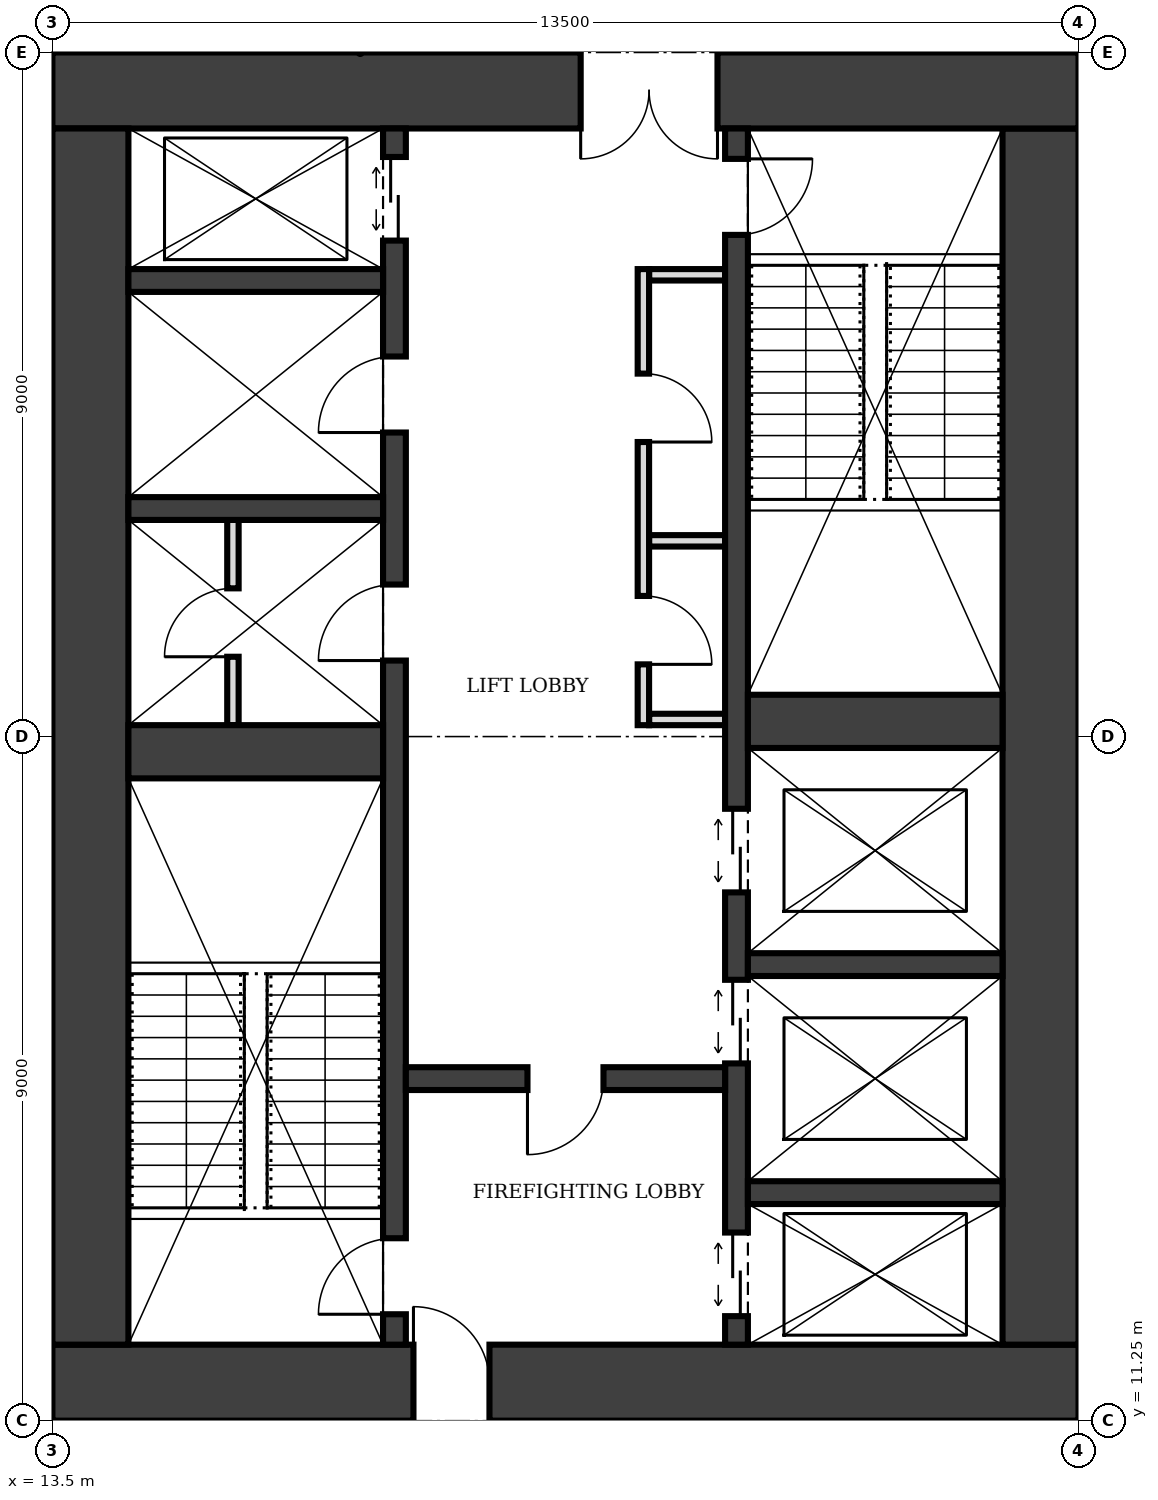
"""IFC4 building model, lengths in metres.
Left out: names, types, materials, properties, quantities, classifications, styles, units other than length and angle.
Written with IfcOpenShell. Run it as: python <this file> out.ifc"""

import sys

from ifc_helpers import new_model, si_unit, direction, frame, frame_2d, origin, place, context, subcontext, project, spatial, rectangle, extrude, element, fill, save


model = new_model("IFC4")
c1 = context("Model", 3, precision=1e-05, world=origin(), true_north=direction((0.0, 1.0)))
c2 = subcontext(c1, "Body", "Model", "MODEL_VIEW")
j1 = project(units=[si_unit("LENGTHUNIT", "METRE"), si_unit("PLANEANGLEUNIT", "RADIAN")], contexts=[c1])
p1 = place(None, origin())
s1 = spatial("IfcSite", under=j1, at=p1, CompositionType="ELEMENT")
p2 = place(p1, origin())
s2 = spatial("IfcBuilding", under=s1, at=p2, CompositionType="ELEMENT")
p3 = place(p2, frame((0.0, 0.0, 125.0)))
s3 = spatial("IfcBuildingStorey", under=s2, at=p3, CompositionType="ELEMENT", Elevation=125.0)
p4 = place(p3, frame((13.5, 11.75, 0.0), z_axis=(0.0, 0.0, 1.0), x_axis=(1.0, 0.0, 0.0)))
e1 = element("IfcWall", 1, at=p4, inside=s3, PredefinedType="SHEAR", context=c2, shape_type="SweptSolid", body=[
    extrude(rectangle(XDim=13.5, YDim=1.0, at=frame_2d((6.75, 0.0))), origin(), (0.0, 0.0, 1.0), 4.0),
])
p5 = place(p4, frame((4.75, 0.0, 0.0)))
e2 = element("IfcOpeningElement", 2, at=p5, cuts=e1, PredefinedType="OPENING", context=c2, shape_type="SweptSolid", body=[
    extrude(rectangle(XDim=1.0, YDim=2.1, at=frame_2d((0.5, 1.05))), frame((0.0, 0.51, 0.0), z_axis=(0.0, -1.0, 0.0), x_axis=(1.0, 0.0, 0.0)), (0.0, 0.0, 1.0), 1.02),
])
p6 = place(p3, frame((26.5, 12.25, 0.0), z_axis=(0.0, 0.0, 1.0), x_axis=(0.0, 1.0, 0.0)))
e3 = element("IfcWall", 3, at=p6, inside=s3, PredefinedType="SHEAR", context=c2, shape_type="SweptSolid", body=[
    extrude(rectangle(XDim=16.0, YDim=1.0, at=frame_2d((8.0, 0.0))), origin(), (0.0, 0.0, 1.0), 4.0),
])
p7 = place(p3, frame((27.0, 28.75, 0.0), z_axis=(0.0, 0.0, 1.0), x_axis=(-1.0, 0.0, 0.0)))
e4 = element("IfcWall", 4, at=p7, inside=s3, PredefinedType="SHEAR", context=c2, shape_type="SweptSolid", body=[
    extrude(rectangle(XDim=13.5, YDim=1.0, at=frame_2d((6.75, 0.0))), origin(), (0.0, 0.0, 1.0), 4.0),
])
p8 = place(p7, frame((4.75, 0.0, 0.0)))
e5 = element("IfcOpeningElement", 5, at=p8, cuts=e4, PredefinedType="OPENING", context=c2, shape_type="SweptSolid", body=[
    extrude(rectangle(XDim=1.8, YDim=2.1, at=frame_2d((0.9, 1.05))), frame((0.0, 0.51, 0.0), z_axis=(0.0, -1.0, 0.0), x_axis=(1.0, 0.0, 0.0)), (0.0, 0.0, 1.0), 1.02),
])
p9 = place(p3, frame((14.0, 28.25, 0.0), z_axis=(0.0, 0.0, 1.0), x_axis=(0.0, -1.0, 0.0)))
e6 = element("IfcWall", 6, at=p9, inside=s3, PredefinedType="SHEAR", context=c2, shape_type="SweptSolid", body=[
    extrude(rectangle(XDim=16.0, YDim=1.0, at=frame_2d((8.0, 0.0))), origin(), (0.0, 0.0, 1.0), 4.0),
])
p10 = place(p3, frame((18.0, 12.25, 0.0), z_axis=(0.0, 0.0, 1.0), x_axis=(0.0, 1.0, 0.0)))
e7 = element("IfcWall", 7, at=p10, inside=s3, PredefinedType="SHEAR", context=c2, shape_type="SweptSolid", body=[
    extrude(rectangle(XDim=16.0, YDim=0.3, at=frame_2d((8.0, 0.0))), origin(), (0.0, 0.0, 1.0), 4.0),
])
p11 = place(p10, frame((0.4, 0.0, 0.0)))
e8 = element("IfcOpeningElement", 8, at=p11, cuts=e7, PredefinedType="OPENING", context=c2, shape_type="SweptSolid", body=[
    extrude(rectangle(XDim=1.0, YDim=2.1, at=frame_2d((0.5, 1.05))), frame((0.0, 0.16, 0.0), z_axis=(0.0, -1.0, 0.0), x_axis=(1.0, 0.0, 0.0)), (0.0, 0.0, 1.0), 0.32),
])
p12 = place(p10, frame((14.525, 0.0, 0.0)))
e9 = element("IfcOpeningElement", 9, at=p12, cuts=e7, PredefinedType="OPENING", context=c2, shape_type="SweptSolid", body=[
    extrude(rectangle(XDim=1.1, YDim=2.1, at=frame_2d((0.55, 1.05))), frame((0.0, 0.16, 0.0), z_axis=(0.0, -1.0, 0.0), x_axis=(1.0, 0.0, 0.0)), (0.0, 0.0, 1.0), 0.32),
])
p13 = place(p10, frame((9.0, 0.0, 0.0)))
e10 = element("IfcOpeningElement", 10, at=p13, cuts=e7, PredefinedType="OPENING", context=c2, shape_type="SweptSolid", body=[
    extrude(rectangle(XDim=1.0, YDim=2.1, at=frame_2d((0.5, 1.05))), frame((0.0, 0.16, 0.0), z_axis=(0.0, -1.0, 0.0), x_axis=(1.0, 0.0, 0.0)), (0.0, 0.0, 1.0), 0.32),
])
p14 = place(p10, frame((12.0, 0.0, 0.0)))
e11 = element("IfcOpeningElement", 11, at=p14, cuts=e7, PredefinedType="OPENING", context=c2, shape_type="SweptSolid", body=[
    extrude(rectangle(XDim=1.0, YDim=2.1, at=frame_2d((0.5, 1.05))), frame((0.0, 0.16, 0.0), z_axis=(0.0, -1.0, 0.0), x_axis=(1.0, 0.0, 0.0)), (0.0, 0.0, 1.0), 0.32),
])
p15 = place(p3, frame((22.5, 12.25, 0.0), z_axis=(0.0, 0.0, 1.0), x_axis=(0.0, 1.0, 0.0)))
e12 = element("IfcWall", 12, at=p15, inside=s3, PredefinedType="SHEAR", context=c2, shape_type="SweptSolid", body=[
    extrude(rectangle(XDim=16.0, YDim=0.3, at=frame_2d((8.0, 0.0))), origin(), (0.0, 0.0, 1.0), 4.0),
])
p16 = place(p15, frame((14.6, 0.0, 0.0)))
e13 = element("IfcOpeningElement", 13, at=p16, cuts=e12, PredefinedType="OPENING", context=c2, shape_type="SweptSolid", body=[
    extrude(rectangle(XDim=1.0, YDim=2.1, at=frame_2d((0.5, 1.05))), frame((0.0, 0.16, 0.0), z_axis=(0.0, -1.0, 0.0), x_axis=(1.0, 0.0, 0.0)), (0.0, 0.0, 1.0), 0.32),
])
p17 = place(p15, frame((0.375, 0.0, 0.0)))
e14 = element("IfcOpeningElement", 14, at=p17, cuts=e12, PredefinedType="OPENING", context=c2, shape_type="SweptSolid", body=[
    extrude(rectangle(XDim=1.1, YDim=2.1, at=frame_2d((0.55, 1.05))), frame((0.0, 0.16, 0.0), z_axis=(0.0, -1.0, 0.0), x_axis=(1.0, 0.0, 0.0)), (0.0, 0.0, 1.0), 0.32),
])
p18 = place(p15, frame((3.7, 0.0, 0.0)))
e15 = element("IfcOpeningElement", 15, at=p18, cuts=e12, PredefinedType="OPENING", context=c2, shape_type="SweptSolid", body=[
    extrude(rectangle(XDim=1.1, YDim=2.1, at=frame_2d((0.55, 1.05))), frame((0.0, 0.16, 0.0), z_axis=(0.0, -1.0, 0.0), x_axis=(1.0, 0.0, 0.0)), (0.0, 0.0, 1.0), 0.32),
])
p19 = place(p15, frame((5.95, 0.0, 0.0)))
e16 = element("IfcOpeningElement", 16, at=p19, cuts=e12, PredefinedType="OPENING", context=c2, shape_type="SweptSolid", body=[
    extrude(rectangle(XDim=1.1, YDim=2.1, at=frame_2d((0.55, 1.05))), frame((0.0, 0.16, 0.0), z_axis=(0.0, -1.0, 0.0), x_axis=(1.0, 0.0, 0.0)), (0.0, 0.0, 1.0), 0.32),
])
p20 = place(p3, frame((14.5, 20.05, 0.0), z_axis=(0.0, 0.0, 1.0), x_axis=(1.0, 0.0, 0.0)))
e17 = element("IfcWall", 17, at=p20, inside=s3, PredefinedType="SHEAR", context=c2, shape_type="SweptSolid", body=[
    extrude(rectangle(XDim=3.35, YDim=0.7, at=frame_2d((1.675, 0.0))), origin(), (0.0, 0.0, 1.0), 4.0),
])
p21 = place(p3, frame((18.15, 15.75, 0.0), z_axis=(0.0, 0.0, 1.0), x_axis=(1.0, 0.0, 0.0)))
e18 = element("IfcWall", 18, at=p21, inside=s3, PredefinedType="SHEAR", context=c2, shape_type="SweptSolid", body=[
    extrude(rectangle(XDim=4.2, YDim=0.3, at=frame_2d((2.1, 0.0))), origin(), (0.0, 0.0, 1.0), 4.0),
])
p22 = place(p21, frame((1.6, 0.0, 0.0)))
e19 = element("IfcOpeningElement", 19, at=p22, cuts=e18, PredefinedType="OPENING", context=c2, shape_type="SweptSolid", body=[
    extrude(rectangle(XDim=1.0, YDim=2.1, at=frame_2d((0.5, 1.05))), frame((0.0, 0.16, 0.0), z_axis=(0.0, -1.0, 0.0), x_axis=(1.0, 0.0, 0.0)), (0.0, 0.0, 1.0), 0.32),
])
for number, where, z_axis, x_axis in (
    (20, (22.65, 14.25, 0.0), (0.0, 0.0, 1.0), (1.0, 0.0, 0.0)),
    (21, (22.65, 17.25, 0.0), (0.0, 0.0, 1.0), (1.0, 0.0, 0.0)),
):
    element("IfcWall", number, at=place(p3, frame(where, z_axis=z_axis, x_axis=x_axis)), inside=s3, PredefinedType="SHEAR", context=c2, shape_type="SweptSolid", body=[
        extrude(rectangle(XDim=3.35, YDim=0.3, at=frame_2d((1.675, 0.0))), origin(), (0.0, 0.0, 1.0), 4.0),
    ])
p23 = place(p3, frame((22.65, 20.45, 0.0), z_axis=(0.0, 0.0, 1.0), x_axis=(1.0, 0.0, 0.0)))
e22 = element("IfcWall", 22, at=p23, inside=s3, PredefinedType="SHEAR", context=c2, shape_type="SweptSolid", body=[
    extrude(rectangle(XDim=3.35, YDim=0.7, at=frame_2d((1.675, 0.0))), origin(), (0.0, 0.0, 1.0), 4.0),
])
for number, where, z_axis, x_axis in (
    (23, (14.5, 23.25, 0.0), (0.0, 0.0, 1.0), (1.0, 0.0, 0.0)),
    (24, (14.5, 26.25, 0.0), (0.0, 0.0, 1.0), (1.0, 0.0, 0.0)),
):
    element("IfcWall", number, at=place(p3, frame(where, z_axis=z_axis, x_axis=x_axis)), inside=s3, PredefinedType="SHEAR", context=c2, shape_type="SweptSolid", body=[
        extrude(rectangle(XDim=3.35, YDim=0.3, at=frame_2d((1.675, 0.0))), origin(), (0.0, 0.0, 1.0), 4.0),
    ])
p24 = place(p3, frame((21.275, 20.4, 0.0), z_axis=(0.0, 0.0, 1.0), x_axis=(0.0, 1.0, 0.0)))
e25 = element("IfcWall", 25, at=p24, inside=s3, PredefinedType="PARTITIONING", context=c2, shape_type="SweptSolid", body=[
    extrude(rectangle(XDim=6.0, YDim=0.15, at=frame_2d((3.0, 0.0))), origin(), (0.0, 0.0, 1.0), 3.75),
])
p25 = place(p24, frame((0.8, 0.0, 0.0)))
e26 = element("IfcOpeningElement", 26, at=p25, cuts=e25, PredefinedType="OPENING", context=c2, shape_type="SweptSolid", body=[
    extrude(rectangle(XDim=0.9, YDim=2.1, at=frame_2d((0.45, 1.05))), frame((0.0, 0.085, 0.0), z_axis=(0.0, -1.0, 0.0), x_axis=(1.0, 0.0, 0.0)), (0.0, 0.0, 1.0), 0.17),
])
p26 = place(p24, frame((3.725, 0.0, 0.0)))
e27 = element("IfcOpeningElement", 27, at=p26, cuts=e25, PredefinedType="OPENING", context=c2, shape_type="SweptSolid", body=[
    extrude(rectangle(XDim=0.9, YDim=2.1, at=frame_2d((0.45, 1.05))), frame((0.0, 0.085, 0.0), z_axis=(0.0, -1.0, 0.0), x_axis=(1.0, 0.0, 0.0)), (0.0, 0.0, 1.0), 0.17),
])
for number, where, z_axis, x_axis in (
    (28, (21.35, 20.475, 0.0), (0.0, 0.0, 1.0), (1.0, 0.0, 0.0)),
    (29, (21.35, 22.825, 0.0), (0.0, 0.0, 1.0), (1.0, 0.0, 0.0)),
    (30, (21.35, 26.325, 0.0), (0.0, 0.0, 1.0), (1.0, 0.0, 0.0)),
):
    element("IfcWall", number, at=place(p3, frame(where, z_axis=z_axis, x_axis=x_axis)), inside=s3, PredefinedType="PARTITIONING", context=c2, shape_type="SweptSolid", body=[
        extrude(rectangle(XDim=1.0, YDim=0.15, at=frame_2d((0.5, 0.0))), origin(), (0.0, 0.0, 1.0), 3.75),
    ])
p27 = place(p3, frame((15.875, 20.4, 0.0), z_axis=(0.0, 0.0, 1.0), x_axis=(0.0, 1.0, 0.0)))
e31 = element("IfcWall", 31, at=p27, inside=s3, PredefinedType="PARTITIONING", context=c2, shape_type="SweptSolid", body=[
    extrude(rectangle(XDim=2.7, YDim=0.15, at=frame_2d((1.35, 0.0))), origin(), (0.0, 0.0, 1.0), 3.75),
])
p28 = place(p27, frame((0.9, 0.0, 0.0)))
e32 = element("IfcOpeningElement", 32, at=p28, cuts=e31, PredefinedType="OPENING", context=c2, shape_type="SweptSolid", body=[
    extrude(rectangle(XDim=0.9, YDim=2.1, at=frame_2d((0.45, 1.05))), frame((0.0, 0.085, 0.0), z_axis=(0.0, -1.0, 0.0), x_axis=(1.0, 0.0, 0.0)), (0.0, 0.0, 1.0), 0.17),
])
p29 = place(p5, origin())
e33 = element("IfcDoor", 33, at=p29, inside=s3, OperationType="SINGLE_SWING_LEFT", PredefinedType="DOOR", context=c2, shape_type="SweptSolid", body=[
    extrude(rectangle(XDim=1.0, YDim=2.1, at=frame_2d((0.5, 1.05))), frame((0.0, 0.025, 0.0), z_axis=(0.0, -1.0, 0.0), x_axis=(1.0, 0.0, 0.0)), (0.0, 0.0, 1.0), 0.05),
])
fill(e2, e33)
p30 = place(p8, origin())
e34 = element("IfcDoor", 34, at=p30, inside=s3, OperationType="DOUBLE_DOOR_SINGLE_SWING", PredefinedType="DOOR", context=c2, shape_type="SweptSolid", body=[
    extrude(rectangle(XDim=1.8, YDim=2.1, at=frame_2d((0.9, 1.05))), frame((0.0, 0.025, 0.0), z_axis=(0.0, -1.0, 0.0), x_axis=(1.0, 0.0, 0.0)), (0.0, 0.0, 1.0), 0.05),
])
fill(e5, e34)
p31 = place(p22, frame((1.0, 0.0, 0.0), z_axis=(0.0, 0.0, 1.0), x_axis=(-1.0, 0.0, 0.0)))
e35 = element("IfcDoor", 35, at=p31, inside=s3, OperationType="SINGLE_SWING_RIGHT", PredefinedType="DOOR", context=c2, shape_type="SweptSolid", body=[
    extrude(rectangle(XDim=1.0, YDim=2.1, at=frame_2d((0.5, 1.05))), frame((0.0, 0.025, 0.0), z_axis=(0.0, -1.0, 0.0), x_axis=(1.0, 0.0, 0.0)), (0.0, 0.0, 1.0), 0.05),
])
fill(e19, e35)
p32 = place(p11, origin())
e36 = element("IfcDoor", 36, at=p32, inside=s3, OperationType="SINGLE_SWING_LEFT", PredefinedType="DOOR", context=c2, shape_type="SweptSolid", body=[
    extrude(rectangle(XDim=1.0, YDim=2.1, at=frame_2d((0.5, 1.05))), frame((0.0, 0.025, 0.0), z_axis=(0.0, -1.0, 0.0), x_axis=(1.0, 0.0, 0.0)), (0.0, 0.0, 1.0), 0.05),
])
fill(e8, e36)
p33 = place(p16, frame((1.0, 0.0, 0.0), z_axis=(0.0, 0.0, 1.0), x_axis=(-1.0, 0.0, 0.0)))
e37 = element("IfcDoor", 37, at=p33, inside=s3, OperationType="SINGLE_SWING_LEFT", PredefinedType="DOOR", context=c2, shape_type="SweptSolid", body=[
    extrude(rectangle(XDim=1.0, YDim=2.1, at=frame_2d((0.5, 1.05))), frame((0.0, 0.025, 0.0), z_axis=(0.0, -1.0, 0.0), x_axis=(1.0, 0.0, 0.0)), (0.0, 0.0, 1.0), 0.05),
])
fill(e13, e37)
p34 = place(p17, origin())
e38 = element("IfcDoor", 38, at=p34, inside=s3, OperationType="DOUBLE_DOOR_SLIDING", PredefinedType="DOOR", context=c2, shape_type="SweptSolid", body=[
    extrude(rectangle(XDim=1.1, YDim=2.1, at=frame_2d((0.55, 1.05))), frame((0.0, 0.025, 0.0), z_axis=(0.0, -1.0, 0.0), x_axis=(1.0, 0.0, 0.0)), (0.0, 0.0, 1.0), 0.05),
])
fill(e14, e38)
p35 = place(p12, origin())
e39 = element("IfcDoor", 39, at=p35, inside=s3, OperationType="DOUBLE_DOOR_SLIDING", PredefinedType="DOOR", context=c2, shape_type="SweptSolid", body=[
    extrude(rectangle(XDim=1.1, YDim=2.1, at=frame_2d((0.55, 1.05))), frame((0.0, 0.025, 0.0), z_axis=(0.0, -1.0, 0.0), x_axis=(1.0, 0.0, 0.0)), (0.0, 0.0, 1.0), 0.05),
])
fill(e9, e39)
p36 = place(p18, origin())
e40 = element("IfcDoor", 40, at=p36, inside=s3, OperationType="DOUBLE_DOOR_SLIDING", PredefinedType="DOOR", context=c2, shape_type="SweptSolid", body=[
    extrude(rectangle(XDim=1.1, YDim=2.1, at=frame_2d((0.55, 1.05))), frame((0.0, 0.025, 0.0), z_axis=(0.0, -1.0, 0.0), x_axis=(1.0, 0.0, 0.0)), (0.0, 0.0, 1.0), 0.05),
])
fill(e15, e40)
p37 = place(p19, origin())
e41 = element("IfcDoor", 41, at=p37, inside=s3, OperationType="DOUBLE_DOOR_SLIDING", PredefinedType="DOOR", context=c2, shape_type="SweptSolid", body=[
    extrude(rectangle(XDim=1.1, YDim=2.1, at=frame_2d((0.55, 1.05))), frame((0.0, 0.025, 0.0), z_axis=(0.0, -1.0, 0.0), x_axis=(1.0, 0.0, 0.0)), (0.0, 0.0, 1.0), 0.05),
])
fill(e16, e41)
p38 = place(p25, frame((0.9, 0.0, 0.0), z_axis=(0.0, 0.0, 1.0), x_axis=(-1.0, 0.0, 0.0)))
e42 = element("IfcDoor", 42, at=p38, inside=s3, OperationType="SINGLE_SWING_RIGHT", PredefinedType="DOOR", context=c2, shape_type="SweptSolid", body=[
    extrude(rectangle(XDim=0.9, YDim=2.1, at=frame_2d((0.45, 1.05))), frame((0.0, 0.025, 0.0), z_axis=(0.0, -1.0, 0.0), x_axis=(1.0, 0.0, 0.0)), (0.0, 0.0, 1.0), 0.05),
])
fill(e26, e42)
p39 = place(p26, frame((0.9, 0.0, 0.0), z_axis=(0.0, 0.0, 1.0), x_axis=(-1.0, 0.0, 0.0)))
e43 = element("IfcDoor", 43, at=p39, inside=s3, OperationType="SINGLE_SWING_RIGHT", PredefinedType="DOOR", context=c2, shape_type="SweptSolid", body=[
    extrude(rectangle(XDim=0.9, YDim=2.1, at=frame_2d((0.45, 1.05))), frame((0.0, 0.025, 0.0), z_axis=(0.0, -1.0, 0.0), x_axis=(1.0, 0.0, 0.0)), (0.0, 0.0, 1.0), 0.05),
])
fill(e27, e43)
p40 = place(p13, origin())
e44 = element("IfcDoor", 44, at=p40, inside=s3, OperationType="SINGLE_SWING_LEFT", PredefinedType="DOOR", context=c2, shape_type="SweptSolid", body=[
    extrude(rectangle(XDim=1.0, YDim=2.1, at=frame_2d((0.5, 1.05))), frame((0.0, 0.025, 0.0), z_axis=(0.0, -1.0, 0.0), x_axis=(1.0, 0.0, 0.0)), (0.0, 0.0, 1.0), 0.05),
])
fill(e10, e44)
p41 = place(p28, origin())
e45 = element("IfcDoor", 45, at=p41, inside=s3, OperationType="SINGLE_SWING_LEFT", PredefinedType="DOOR", context=c2, shape_type="SweptSolid", body=[
    extrude(rectangle(XDim=0.9, YDim=2.1, at=frame_2d((0.45, 1.05))), frame((0.0, 0.025, 0.0), z_axis=(0.0, -1.0, 0.0), x_axis=(1.0, 0.0, 0.0)), (0.0, 0.0, 1.0), 0.05),
])
fill(e32, e45)
p42 = place(p14, origin())
e46 = element("IfcDoor", 46, at=p42, inside=s3, OperationType="SINGLE_SWING_LEFT", PredefinedType="DOOR", context=c2, shape_type="SweptSolid", body=[
    extrude(rectangle(XDim=1.0, YDim=2.1, at=frame_2d((0.5, 1.05))), frame((0.0, 0.025, 0.0), z_axis=(0.0, -1.0, 0.0), x_axis=(1.0, 0.0, 0.0)), (0.0, 0.0, 1.0), 0.05),
])
fill(e11, e46)
save(model, sys.argv[1])
